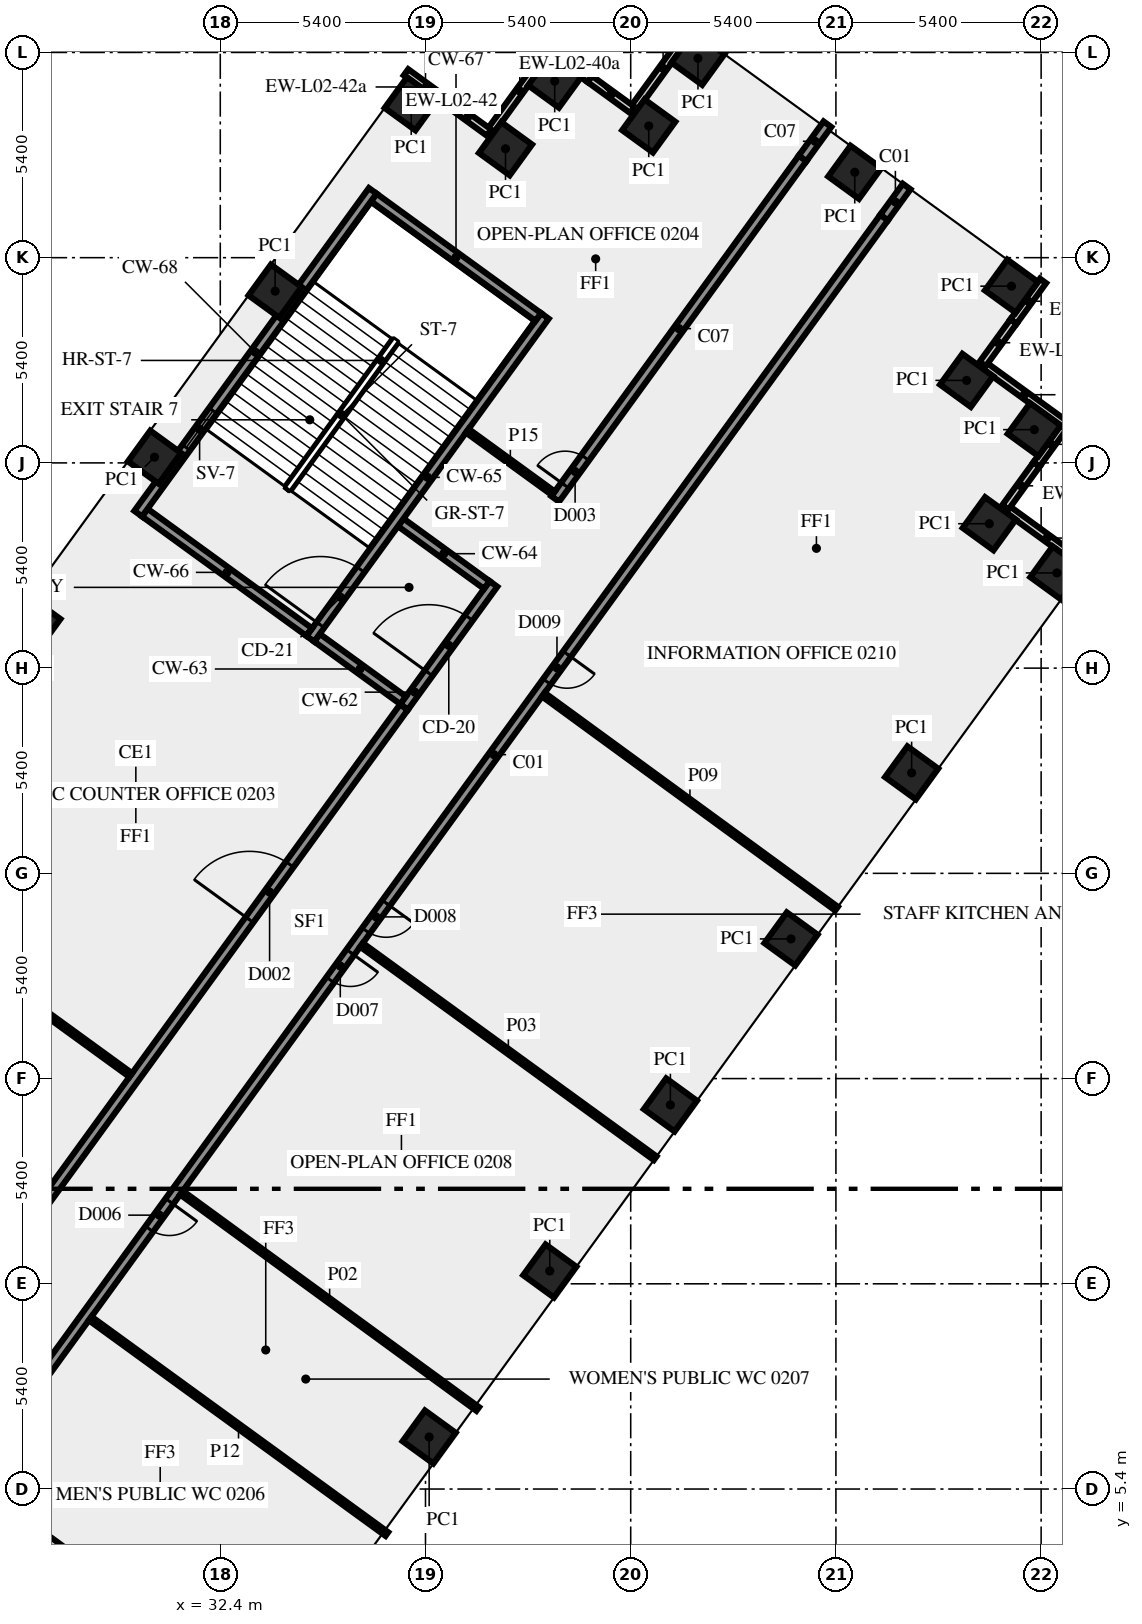
"""IFC4 building model, lengths in metres.
Left out: names, types, materials, properties, quantities, classifications, styles, units other than length and angle.
Written with IfcOpenShell. Run it as: python <this file> out.ifc"""

import sys

from ifc_helpers import new_model, si_unit, direction, frame, frame_2d, origin, origin_2d, place, context, subcontext, project, spatial, rectangle, extrude, element, fill, save


model = new_model("IFC4")
c1 = context("Model", 3, precision=1e-05, world=origin(), true_north=direction((0.0, 1.0)))
c2 = subcontext(c1, "Body", "Model", "MODEL_VIEW")
j1 = project(units=[si_unit("LENGTHUNIT", "METRE"), si_unit("PLANEANGLEUNIT", "RADIAN")], contexts=[c1])
p1 = place(None, origin())
s1 = spatial("IfcSite", under=j1, at=p1, CompositionType="ELEMENT")
p2 = place(p1, origin())
s2 = spatial("IfcBuilding", under=s1, at=p2, CompositionType="ELEMENT")
p3 = place(p2, frame((0.0, 0.0, 11.5)))
s3 = spatial("IfcBuildingStorey", under=s2, at=p3, CompositionType="ELEMENT", Elevation=11.5)
for number, where, z_axis, x_axis in (
    (1, (37.896, 6.769, 0.0), (0.0, 0.0, 1.0), (0.588, 0.809, 0.0)),
    (2, (41.07, 11.137, 0.0), (0.0, 0.0, 1.0), (0.588, 0.809, 0.0)),
    (3, (44.244, 15.506, 0.0), (0.0, 0.0, 1.0), (0.588, 0.809, 0.0)),
    (4, (47.418, 19.875, 0.0), (0.0, 0.0, 1.0), (0.588, 0.809, 0.0)),
    (5, (50.592, 24.243, 0.0), (0.0, 0.0, 1.0), (0.588, 0.809, 0.0)),
    (6, (54.415, 29.505, 0.0), (0.0, 0.0, 1.0), (0.588, 0.809, 0.0)),
    (7, (52.636, 30.8, 0.0), (0.0, 0.0, 1.0), (-0.809, 0.588, 0.0)),
    (8, (53.82, 33.275, 0.0), (0.0, 0.0, 1.0), (-0.809, 0.588, 0.0)),
    (9, (52.039, 34.571, 0.0), (0.0, 0.0, 1.0), (0.588, 0.809, 0.0)),
    (10, (53.22, 37.05, 0.0), (0.0, 0.0, 1.0), (-0.809, 0.588, 0.0)),
    (11, (49.096, 40.047, 0.0), (0.0, 0.0, 1.0), (-0.809, 0.588, 0.0)),
    (12, (44.97, 43.045, 0.0), (0.0, 0.0, 1.0), (-0.809, 0.588, 0.0)),
    (13, (43.675, 41.265, 0.0), (0.0, 0.0, 1.0), (-0.809, 0.588, 0.0)),
    (14, (41.2, 42.445, 0.0), (0.0, 0.0, 1.0), (-0.588, -0.809, 0.0)),
    (15, (39.906, 40.666, 0.0), (0.0, 0.0, 1.0), (-0.588, -0.809, 0.0)),
    (16, (37.425, 41.85, 0.0), (0.0, 0.0, 1.0), (-0.588, -0.809, 0.0)),
    (17, (33.843, 36.919, 0.0), (0.0, 0.0, 1.0), (-0.588, -0.809, 0.0)),
    (18, (30.669, 32.55, 0.0), (0.0, 0.0, 1.0), (-0.588, -0.809, 0.0)),
    (19, (27.495, 28.181, 0.0), (0.0, 0.0, 1.0), (-0.588, -0.809, 0.0)),
):
    element("IfcColumn", number, at=place(p3, frame(where, z_axis=z_axis, x_axis=x_axis)), inside=s3, PredefinedType="COLUMN", context=c2, shape_type="SweptSolid", body=[
        extrude(rectangle(XDim=1.0, YDim=1.0, at=origin_2d()), origin(), (0.0, 0.0, 1.0), 4.1),
    ])
p4 = place(p3, frame((55.247, 29.629, 0.0), z_axis=(0.0, 0.0, 1.0), x_axis=(-0.809033161865, 0.587762999008, 0.0)))
e20 = element("IfcWall", 20, at=p4, inside=s3, PredefinedType="SOLIDWALL", context=c2, shape_type="SweptSolid", body=[
    extrude(rectangle(XDim=2.7, YDim=0.2, at=frame_2d((1.35, 0.0))), origin(), (0.0, 0.0, 1.0), 4.1),
])
p5 = place(p3, frame((53.06, 31.233, 0.0), z_axis=(0.0, 0.0, 1.0), x_axis=(0.587776137069, 0.809023616894, 0.0)))
e21 = element("IfcWall", 21, at=p5, inside=s3, PredefinedType="SOLIDWALL", context=c2, shape_type="SweptSolid", body=[
    extrude(rectangle(XDim=1.395, YDim=0.2, at=frame_2d((0.697, 0.0))), origin(), (0.0, 0.0, 1.0), 3.1),
])
p6 = place(p3, frame((53.88, 32.361, 0.0), z_axis=(0.0, 0.0, 1.0), x_axis=(0.587871379726, 0.808954412127, 0.0)))
e22 = element("IfcWall", 22, at=p6, inside=s3, PredefinedType="SOLIDWALL", context=c2, shape_type="SweptSolid", body=[
    extrude(rectangle(XDim=1.305, YDim=0.2, at=frame_2d((0.653, 0.0))), origin(), (0.0, 0.0, 1.0), 4.1),
])
p7 = place(p3, frame((54.65, 33.4, 0.0), z_axis=(0.0, 0.0, 1.0), x_axis=(-0.809033161865, 0.587762999008, 0.0)))
e23 = element("IfcWall", 23, at=p7, inside=s3, PredefinedType="SOLIDWALL", context=c2, shape_type="SweptSolid", body=[
    extrude(rectangle(XDim=2.7, YDim=0.2, at=frame_2d((1.35, 0.0))), origin(), (0.0, 0.0, 1.0), 4.1),
])
p8 = place(p3, frame((52.463, 35.004, 0.0), z_axis=(0.0, 0.0, 1.0), x_axis=(0.587782252522, 0.809019173827, 0.0)))
e24 = element("IfcWall", 24, at=p8, inside=s3, PredefinedType="SOLIDWALL", context=c2, shape_type="SweptSolid", body=[
    extrude(rectangle(XDim=1.379, YDim=0.2, at=frame_2d((0.69, 0.0))), origin(), (0.0, 0.0, 1.0), 3.1),
])
p9 = place(p3, frame((53.273, 36.12, 0.0), z_axis=(0.0, 0.0, 1.0), x_axis=(0.58786388341, 0.808959859686, 0.0)))
e25 = element("IfcWall", 25, at=p9, inside=s3, PredefinedType="SOLIDWALL", context=c2, shape_type="SweptSolid", body=[
    extrude(rectangle(XDim=1.321, YDim=0.2, at=frame_2d((0.66, 0.0))), origin(), (0.0, 0.0, 1.0), 4.1),
])
p10 = place(p3, frame((44.846, 43.875, 0.0), z_axis=(0.0, 0.0, 1.0), x_axis=(-0.587822180636, -0.808990163075, 0.0)))
e26 = element("IfcWall", 26, at=p10, inside=s3, PredefinedType="SOLIDWALL", context=c2, shape_type="SweptSolid", body=[
    extrude(rectangle(XDim=2.7, YDim=0.2, at=frame_2d((1.35, 0.0))), origin(), (0.0, 0.0, 1.0), 4.1),
])
p11 = place(p3, frame((43.242, 41.688, 0.0), z_axis=(0.0, 0.0, 1.0), x_axis=(-0.808926734208, 0.5879094647, 0.0)))
e27 = element("IfcWall", 27, at=p11, inside=s3, PredefinedType="SOLIDWALL", context=c2, shape_type="SweptSolid", body=[
    extrude(rectangle(XDim=1.384, YDim=0.2, at=frame_2d((0.692, 0.0))), origin(), (0.0, 0.0, 1.0), 3.1),
])
p12 = place(p3, frame((42.123, 42.502, 0.0), z_axis=(0.0, 0.0, 1.0), x_axis=(-0.809056865039, 0.587730371117, 0.0)))
e28 = element("IfcWall", 28, at=p12, inside=s3, PredefinedType="SOLIDWALL", context=c2, shape_type="SweptSolid", body=[
    extrude(rectangle(XDim=1.316, YDim=0.2, at=frame_2d((0.658, 0.0))), origin(), (0.0, 0.0, 1.0), 4.1),
])
p13 = place(p3, frame((41.075, 43.278, 0.0), z_axis=(0.0, 0.0, 1.0), x_axis=(-0.587806000234, -0.809001919707, 0.0)))
e29 = element("IfcWall", 29, at=p13, inside=s3, PredefinedType="SOLIDWALL", context=c2, shape_type="SweptSolid", body=[
    extrude(rectangle(XDim=2.7, YDim=0.2, at=frame_2d((1.35, 0.0))), origin(), (0.0, 0.0, 1.0), 4.1),
])
p14 = place(p3, frame((39.471, 41.091, 0.0), z_axis=(0.0, 0.0, 1.0), x_axis=(-0.809002762913, 0.58780483972, 0.0)))
e30 = element("IfcWall", 30, at=p14, inside=s3, PredefinedType="SOLIDWALL", context=c2, shape_type="SweptSolid", body=[
    extrude(rectangle(XDim=1.385, YDim=0.2, at=frame_2d((0.693, 0.0))), origin(), (0.0, 0.0, 1.0), 3.1),
])
p15 = place(p3, frame((38.351, 41.905, 0.0), z_axis=(0.0, 0.0, 1.0), x_axis=(-0.809065186597, 0.587718915671, 0.0)))
e31 = element("IfcWall", 31, at=p15, inside=s3, PredefinedType="SOLIDWALL", context=c2, shape_type="SweptSolid", body=[
    extrude(rectangle(XDim=1.315, YDim=0.2, at=frame_2d((0.657, 0.0))), origin(), (0.0, 0.0, 1.0), 4.1),
])
p16 = place(p3, frame((37.238, 25.98, 0.0), z_axis=(0.0, 0.0, 1.0), x_axis=(0.587772420479, 0.809026317077, 0.0)))
e32 = element("IfcWall", 32, at=p16, inside=s3, PredefinedType="SHEAR", context=c2, shape_type="SweptSolid", body=[
    extrude(rectangle(XDim=4.0, YDim=0.25, at=frame_2d((2.0, 0.0))), origin(), (0.0, 0.0, 1.0), 4.1),
])
p17 = place(p16, frame((1.1, 0.0, 0.0)))
e33 = element("IfcOpeningElement", 33, at=p17, cuts=e32, PredefinedType="OPENING", context=c2, shape_type="SweptSolid", body=[
    extrude(rectangle(XDim=1.8, YDim=2.1, at=frame_2d((0.9, 1.05))), frame((0.0, 0.135, 0.0), z_axis=(0.0, -1.0, 0.0), x_axis=(1.0, 0.0, 0.0)), (0.0, 0.0, 1.0), 0.27),
])
for number, where, z_axis, x_axis in (
    (34, (37.21, 26.154, 0.0), (0.0, 0.0, 1.0), (-0.809, 0.588, 0.0)),
    (35, (39.414, 29.188, 0.0), (0.0, 0.0, 1.0), (-0.809, 0.588, 0.0)),
):
    element("IfcWall", number, at=place(p3, frame(where, z_axis=z_axis, x_axis=x_axis)), inside=s3, PredefinedType="SHEAR", context=c2, shape_type="SweptSolid", body=[
        extrude(rectangle(XDim=2.8, YDim=0.25, at=frame_2d((1.4, 0.0))), origin(), (0.0, 0.0, 1.0), 4.1),
    ])
p18 = place(p3, frame((34.77, 27.772, 0.0), z_axis=(0.0, 0.0, 1.0), x_axis=(0.587795589702, 0.809009483706, 0.0)))
e36 = element("IfcWall", 36, at=p18, inside=s3, PredefinedType="SHEAR", context=c2, shape_type="SweptSolid", body=[
    extrude(rectangle(XDim=10.5, YDim=0.25, at=frame_2d((5.25, 0.0))), origin(), (0.0, 0.0, 1.0), 4.1),
])
p19 = place(p18, frame((0.45, 0.0, 0.0)))
e37 = element("IfcOpeningElement", 37, at=p19, cuts=e36, PredefinedType="OPENING", context=c2, shape_type="SweptSolid", body=[
    extrude(rectangle(XDim=1.8, YDim=2.1, at=frame_2d((0.9, 1.05))), frame((0.0, 0.135, 0.0), z_axis=(0.0, -1.0, 0.0), x_axis=(1.0, 0.0, 0.0)), (0.0, 0.0, 1.0), 0.27),
])
p20 = place(p3, frame((34.742, 27.947, 0.0), z_axis=(0.0, 0.0, 1.0), x_axis=(-0.8089984606, 0.587810760999, 0.0)))
e38 = element("IfcWall", 38, at=p20, inside=s3, PredefinedType="SHEAR", context=c2, shape_type="SweptSolid", body=[
    extrude(rectangle(XDim=5.35, YDim=0.25, at=frame_2d((2.675, 0.0))), origin(), (0.0, 0.0, 1.0), 4.1),
])
p21 = place(p3, frame((40.767, 36.24, 0.0), z_axis=(0.0, 0.0, 1.0), x_axis=(-0.809020161303, 0.587780893365, 0.0)))
e39 = element("IfcWall", 39, at=p21, inside=s3, PredefinedType="SHEAR", context=c2, shape_type="SweptSolid", body=[
    extrude(rectangle(XDim=5.35, YDim=0.25, at=frame_2d((2.675, 0.0))), origin(), (0.0, 0.0, 1.0), 4.1),
])
p22 = place(p3, frame((30.24, 31.064, 0.0), z_axis=(0.0, 0.0, 1.0), x_axis=(0.587795589702, 0.809009483706, 0.0)))
e40 = element("IfcWall", 40, at=p22, inside=s3, PredefinedType="SHEAR", context=c2, shape_type="SweptSolid", body=[
    extrude(rectangle(XDim=10.5, YDim=0.25, at=frame_2d((5.25, 0.0))), origin(), (0.0, 0.0, 1.0), 4.1),
])
p23 = place(p22, frame((2.15, 0.0, 1.0)))
e41 = element("IfcOpeningElement", 41, at=p23, cuts=e40, PredefinedType="OPENING", context=c2, shape_type="SweptSolid", body=[
    extrude(rectangle(XDim=1.2, YDim=1.2, at=frame_2d((0.6, 0.6))), frame((0.0, 0.135, 0.0), z_axis=(0.0, -1.0, 0.0), x_axis=(1.0, 0.0, 0.0)), (0.0, 0.0, 1.0), 0.27),
])
p24 = place(p3, frame((49.869, 38.856, 0.0), z_axis=(0.0, 0.0, 1.0), x_axis=(-0.587784522481, -0.809017524614, 0.0)))
e42 = element("IfcWall", 42, at=p24, inside=s3, PredefinedType="SOLIDWALL", context=c2, shape_type="SweptSolid", body=[
    extrude(rectangle(XDim=49.912, YDim=0.25, at=frame_2d((24.956, 0.0))), origin(), (0.0, 0.0, 1.0), 4.1),
])
p25 = place(p24, frame((23.897, 0.0, 0.0)))
e43 = element("IfcOpeningElement", 43, at=p25, cuts=e42, PredefinedType="OPENING", context=c2, shape_type="SweptSolid", body=[
    extrude(rectangle(XDim=0.9, YDim=2.1, at=frame_2d((0.45, 1.05))), frame((0.0, 0.135, 0.0), z_axis=(0.0, -1.0, 0.0), x_axis=(1.0, 0.0, 0.0)), (0.0, 0.0, 1.0), 0.27),
])
p26 = place(p24, frame((14.196, 0.0, 0.0)))
e44 = element("IfcOpeningElement", 44, at=p26, cuts=e42, PredefinedType="OPENING", context=c2, shape_type="SweptSolid", body=[
    extrude(rectangle(XDim=0.9, YDim=2.1, at=frame_2d((0.45, 1.05))), frame((0.0, 0.135, 0.0), z_axis=(0.0, -1.0, 0.0), x_axis=(1.0, 0.0, 0.0)), (0.0, 0.0, 1.0), 0.27),
])
p27 = place(p24, frame((39.847, 0.0, 0.0)))
e45 = element("IfcOpeningElement", 45, at=p27, cuts=e42, PredefinedType="OPENING", context=c2, shape_type="SweptSolid", body=[
    extrude(rectangle(XDim=0.9, YDim=2.1, at=frame_2d((0.45, 1.05))), frame((0.0, 0.135, 0.0), z_axis=(0.0, -1.0, 0.0), x_axis=(1.0, 0.0, 0.0)), (0.0, 0.0, 1.0), 0.27),
])
p28 = place(p24, frame((41.446, 0.0, 0.0)))
e46 = element("IfcOpeningElement", 46, at=p28, cuts=e42, PredefinedType="OPENING", context=c2, shape_type="SweptSolid", body=[
    extrude(rectangle(XDim=0.9, YDim=2.1, at=frame_2d((0.45, 1.05))), frame((0.0, 0.135, 0.0), z_axis=(0.0, -1.0, 0.0), x_axis=(1.0, 0.0, 0.0)), (0.0, 0.0, 1.0), 0.27),
])
p29 = place(p24, frame((31.997, 0.0, 0.0)))
e47 = element("IfcOpeningElement", 47, at=p29, cuts=e42, PredefinedType="OPENING", context=c2, shape_type="SweptSolid", body=[
    extrude(rectangle(XDim=0.9, YDim=2.1, at=frame_2d((0.45, 1.05))), frame((0.0, 0.135, 0.0), z_axis=(0.0, -1.0, 0.0), x_axis=(1.0, 0.0, 0.0)), (0.0, 0.0, 1.0), 0.27),
])
p30 = place(p24, frame((22.296, 0.0, 0.0)))
e48 = element("IfcOpeningElement", 48, at=p30, cuts=e42, PredefinedType="OPENING", context=c2, shape_type="SweptSolid", body=[
    extrude(rectangle(XDim=0.9, YDim=2.1, at=frame_2d((0.45, 1.05))), frame((0.0, 0.135, 0.0), z_axis=(0.0, -1.0, 0.0), x_axis=(1.0, 0.0, 0.0)), (0.0, 0.0, 1.0), 0.27),
])
p31 = place(p3, frame((17.545, -1.125, 0.0), z_axis=(0.0, 0.0, 1.0), x_axis=(0.587786323093, 0.809016216391, 0.0)))
e49 = element("IfcWall", 49, at=p31, inside=s3, PredefinedType="SOLIDWALL", context=c2, shape_type="SweptSolid", body=[
    extrude(rectangle(XDim=33.493, YDim=0.25, at=frame_2d((16.747, 0.0))), origin(), (0.0, 0.0, 1.0), 4.1),
])
p32 = place(p31, frame((3.441, 0.0, 0.0)))
e50 = element("IfcOpeningElement", 50, at=p32, cuts=e49, PredefinedType="OPENING", context=c2, shape_type="SweptSolid", body=[
    extrude(rectangle(XDim=0.9, YDim=2.1, at=frame_2d((0.45, 1.05))), frame((0.0, 0.135, 0.0), z_axis=(0.0, -1.0, 0.0), x_axis=(1.0, 0.0, 0.0)), (0.0, 0.0, 1.0), 0.27),
])
p33 = place(p31, frame((26.58, 0.0, 0.0)))
e51 = element("IfcOpeningElement", 51, at=p33, cuts=e49, PredefinedType="OPENING", context=c2, shape_type="SweptSolid", body=[
    extrude(rectangle(XDim=1.8, YDim=2.1, at=frame_2d((0.9, 1.05))), frame((0.0, 0.135, 0.0), z_axis=(0.0, -1.0, 0.0), x_axis=(1.0, 0.0, 0.0)), (0.0, 0.0, 1.0), 0.27),
])
p34 = place(p3, frame((41.213, 31.451, 0.0), z_axis=(0.0, 0.0, 1.0), x_axis=(0.587773291021, 0.809025684612, 0.0)))
e52 = element("IfcWall", 52, at=p34, inside=s3, PredefinedType="SOLIDWALL", context=c2, shape_type="SweptSolid", body=[
    extrude(rectangle(XDim=11.079, YDim=0.25, at=frame_2d((5.539, 0.0))), origin(), (0.0, 0.0, 1.0), 4.1),
])
p35 = place(p34, frame((0.441, 0.0, 0.0)))
e53 = element("IfcOpeningElement", 53, at=p35, cuts=e52, PredefinedType="OPENING", context=c2, shape_type="SweptSolid", body=[
    extrude(rectangle(XDim=0.9, YDim=2.1, at=frame_2d((0.45, 1.05))), frame((0.0, 0.135, 0.0), z_axis=(0.0, -1.0, 0.0), x_axis=(1.0, 0.0, 0.0)), (0.0, 0.0, 1.0), 0.27),
])
p36 = place(p3, frame((30.044, 16.292, 0.0), z_axis=(0.0, 0.0, 1.0), x_axis=(-0.80898585166, 0.587828114175, 0.0)))
e54 = element("IfcWall", 54, at=p36, inside=s3, PredefinedType="PARTITIONING", context=c2, shape_type="SweptSolid", body=[
    extrude(rectangle(XDim=9.55, YDim=0.12, at=frame_2d((4.775, 0.0))), origin(), (0.0, 0.0, 1.0), 3.1),
])
p37 = place(p3, frame((31.38, 13.196, 0.0), z_axis=(0.0, 0.0, 1.0), x_axis=(0.807701085448, -0.589592195137, 0.0)))
e55 = element("IfcWall", 55, at=p37, inside=s3, PredefinedType="PARTITIONING", context=c2, shape_type="SweptSolid", body=[
    extrude(rectangle(XDim=9.651, YDim=0.12, at=frame_2d((4.826, 0.0))), origin(), (0.0, 0.0, 1.0), 3.1),
])
p38 = place(p3, frame((43.844, 14.104, 0.0), z_axis=(0.0, 0.0, 1.0), x_axis=(-0.809102944047, 0.587666934526, 0.0)))
e56 = element("IfcWall", 56, at=p38, inside=s3, PredefinedType="PARTITIONING", context=c2, shape_type="SweptSolid", body=[
    extrude(rectangle(XDim=9.55, YDim=0.12, at=frame_2d((4.775, 0.0))), origin(), (0.0, 0.0, 1.0), 3.1),
])
p39 = place(p3, frame((40.902, 26.302, 0.0), z_axis=(0.0, 0.0, 1.0), x_axis=(0.807691251741, -0.589605666408, 0.0)))
e57 = element("IfcWall", 57, at=p39, inside=s3, PredefinedType="PARTITIONING", context=c2, shape_type="SweptSolid", body=[
    extrude(rectangle(XDim=9.55, YDim=0.12, at=frame_2d((4.775, 0.0))), origin(), (0.0, 0.0, 1.0), 3.1),
])
p40 = place(p3, frame((25.826, 5.551, 0.0), z_axis=(0.0, 0.0, 1.0), x_axis=(0.80759810708, -0.589733242612, 0.0)))
e58 = element("IfcWall", 58, at=p40, inside=s3, PredefinedType="SOLIDWALL", context=c2, shape_type="SweptSolid", body=[
    extrude(rectangle(XDim=9.55, YDim=0.2, at=frame_2d((4.775, 0.0))), origin(), (0.0, 0.0, 1.0), 3.1),
])
p41 = place(p3, frame((36.784, 4.215, 0.0), z_axis=(0.0, 0.0, 1.0), x_axis=(-0.808994179369, 0.587816653173, 0.0)))
e59 = element("IfcWall", 59, at=p41, inside=s3, PredefinedType="PARTITIONING", context=c2, shape_type="SweptSolid", body=[
    extrude(rectangle(XDim=9.651, YDim=0.12, at=frame_2d((4.825, 0.0))), origin(), (0.0, 0.0, 1.0), 3.1),
])
p42 = place(p3, frame((38.9, 33.245, 0.0), z_axis=(0.0, 0.0, 1.0), x_axis=(0.809090262332, -0.587684394381, 0.0)))
e60 = element("IfcWall", 60, at=p42, inside=s3, PredefinedType="PARTITIONING", context=c2, shape_type="SweptSolid", body=[
    extrude(rectangle(XDim=2.801, YDim=0.12, at=frame_2d((1.4, 0.0))), origin(), (0.0, 0.0, 1.0), 4.1),
])
p43 = place(p3, frame((49.869, 38.856, 0.0), z_axis=(0.0, 0.0, 1.0), x_axis=(0.587725246084, 0.809060588037, 0.0)))
e61 = element("IfcWall", 61, at=p43, inside=s3, PredefinedType="SOLIDWALL", context=c2, shape_type="SweptSolid", body=[
    extrude(rectangle(XDim=1.008, YDim=0.25, at=frame_2d((0.504, 0.0))), origin(), (0.0, 0.0, 1.0), 3.1),
])
p44 = place(p3, frame((47.725, 40.414, 0.0), z_axis=(0.0, 0.0, 1.0), x_axis=(0.587883639643, 0.808945502639, 0.0)))
e62 = element("IfcWall", 62, at=p44, inside=s3, PredefinedType="SOLIDWALL", context=c2, shape_type="SweptSolid", body=[
    extrude(rectangle(XDim=1.109, YDim=0.25, at=frame_2d((0.554, 0.0))), origin(), (0.0, 0.0, 1.0), 3.1),
])
p45 = place(p17, origin())
e63 = element("IfcDoor", 63, at=p45, inside=s3, OperationType="DOUBLE_DOOR_SINGLE_SWING", PredefinedType="DOOR", context=c2, shape_type="SweptSolid", body=[
    extrude(rectangle(XDim=1.8, YDim=2.1, at=frame_2d((0.9, 1.05))), frame((0.0, 0.025, 0.0), z_axis=(0.0, -1.0, 0.0), x_axis=(1.0, 0.0, 0.0)), (0.0, 0.0, 1.0), 0.05),
])
fill(e33, e63)
p46 = place(p19, origin())
e64 = element("IfcDoor", 64, at=p46, inside=s3, OperationType="DOUBLE_DOOR_SINGLE_SWING", PredefinedType="DOOR", context=c2, shape_type="SweptSolid", body=[
    extrude(rectangle(XDim=1.8, YDim=2.1, at=frame_2d((0.9, 1.05))), frame((0.0, 0.025, 0.0), z_axis=(0.0, -1.0, 0.0), x_axis=(1.0, 0.0, 0.0)), (0.0, 0.0, 1.0), 0.05),
])
fill(e37, e64)
p47 = place(p23, origin())
e65 = element("IfcWindow", 65, at=p47, inside=s3, PartitioningType="SINGLE_PANEL", PredefinedType="WINDOW", context=c2, shape_type="SweptSolid", body=[
    extrude(rectangle(XDim=1.2, YDim=1.2, at=frame_2d((0.6, 0.6))), frame((0.0, 0.03, 0.0), z_axis=(0.0, -1.0, 0.0), x_axis=(1.0, 0.0, 0.0)), (0.0, 0.0, 1.0), 0.06),
])
fill(e41, e65)
p48 = place(p35, origin())
e66 = element("IfcDoor", 66, at=p48, inside=s3, OperationType="SINGLE_SWING_LEFT", PredefinedType="DOOR", context=c2, shape_type="SweptSolid", body=[
    extrude(rectangle(XDim=0.9, YDim=2.1, at=frame_2d((0.45, 1.05))), frame((0.0, 0.025, 0.0), z_axis=(0.0, -1.0, 0.0), x_axis=(1.0, 0.0, 0.0)), (0.0, 0.0, 1.0), 0.05),
])
fill(e53, e66)
p49 = place(p25, origin())
e67 = element("IfcDoor", 67, at=p49, inside=s3, OperationType="SINGLE_SWING_LEFT", PredefinedType="DOOR", context=c2, shape_type="SweptSolid", body=[
    extrude(rectangle(XDim=0.9, YDim=2.1, at=frame_2d((0.45, 1.05))), frame((0.0, 0.025, 0.0), z_axis=(0.0, -1.0, 0.0), x_axis=(1.0, 0.0, 0.0)), (0.0, 0.0, 1.0), 0.05),
])
fill(e43, e67)
p50 = place(p33, origin())
e68 = element("IfcDoor", 68, at=p50, inside=s3, OperationType="DOUBLE_DOOR_SINGLE_SWING", PredefinedType="DOOR", context=c2, shape_type="SweptSolid", body=[
    extrude(rectangle(XDim=1.8, YDim=2.1, at=frame_2d((0.9, 1.05))), frame((0.0, 0.025, 0.0), z_axis=(0.0, -1.0, 0.0), x_axis=(1.0, 0.0, 0.0)), (0.0, 0.0, 1.0), 0.05),
])
fill(e51, e68)
p51 = place(p26, origin())
e69 = element("IfcDoor", 69, at=p51, inside=s3, OperationType="SINGLE_SWING_RIGHT", PredefinedType="DOOR", context=c2, shape_type="SweptSolid", body=[
    extrude(rectangle(XDim=0.9, YDim=2.1, at=frame_2d((0.45, 1.05))), frame((0.0, 0.025, 0.0), z_axis=(0.0, -1.0, 0.0), x_axis=(1.0, 0.0, 0.0)), (0.0, 0.0, 1.0), 0.05),
])
fill(e44, e69)
p52 = place(p29, origin())
e70 = element("IfcDoor", 70, at=p52, inside=s3, OperationType="SINGLE_SWING_LEFT", PredefinedType="DOOR", context=c2, shape_type="SweptSolid", body=[
    extrude(rectangle(XDim=0.9, YDim=2.1, at=frame_2d((0.45, 1.05))), frame((0.0, 0.025, 0.0), z_axis=(0.0, -1.0, 0.0), x_axis=(1.0, 0.0, 0.0)), (0.0, 0.0, 1.0), 0.05),
])
fill(e47, e70)
p53 = place(p30, origin())
e71 = element("IfcDoor", 71, at=p53, inside=s3, OperationType="SINGLE_SWING_RIGHT", PredefinedType="DOOR", context=c2, shape_type="SweptSolid", body=[
    extrude(rectangle(XDim=0.9, YDim=2.1, at=frame_2d((0.45, 1.05))), frame((0.0, 0.025, 0.0), z_axis=(0.0, -1.0, 0.0), x_axis=(1.0, 0.0, 0.0)), (0.0, 0.0, 1.0), 0.05),
])
fill(e48, e71)
save(model, sys.argv[1])
